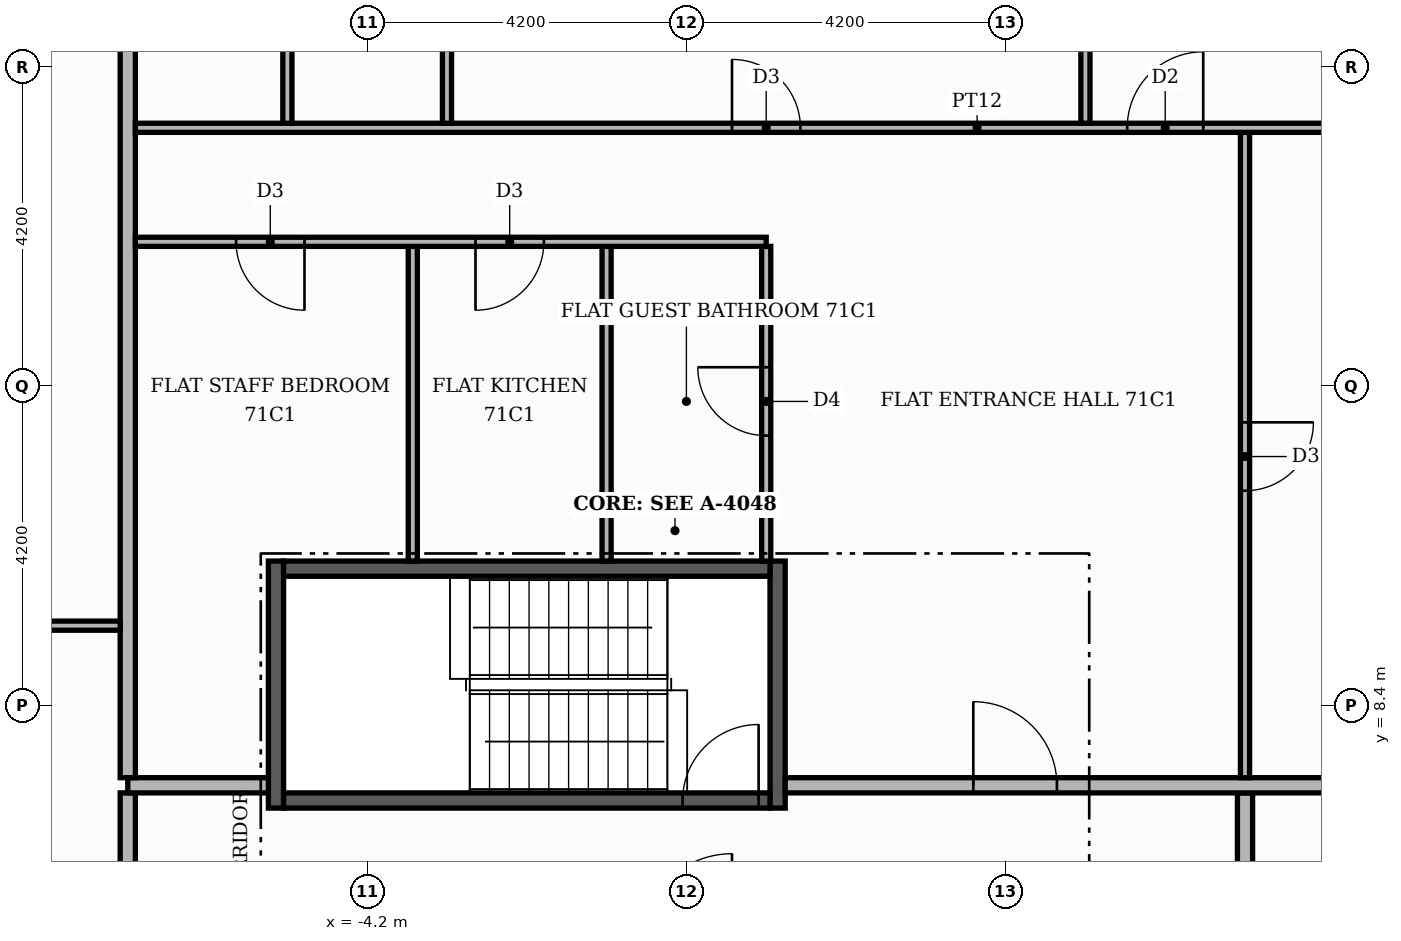
"""IFC4 building model, lengths in metres.
Left out: names, types, materials, properties, quantities, classifications, styles, units other than length and angle.
Written with IfcOpenShell. Run it as: python <this file> out.ifc"""

import sys

from ifc_helpers import new_model, si_unit, direction, frame, frame_2d, origin, place, context, subcontext, project, spatial, rectangle, extrude, element, fill, save


model = new_model("IFC4")
c1 = context("Model", 3, precision=1e-05, world=origin(), true_north=direction((0.0, 1.0)))
c2 = subcontext(c1, "Body", "Model", "MODEL_VIEW")
j1 = project(units=[si_unit("LENGTHUNIT", "METRE"), si_unit("PLANEANGLEUNIT", "RADIAN")], contexts=[c1])
p1 = place(None, origin())
s1 = spatial("IfcSite", under=j1, at=p1, CompositionType="ELEMENT")
p2 = place(p1, origin())
s2 = spatial("IfcBuilding", under=s1, at=p2, CompositionType="ELEMENT")
p3 = place(p2, frame((0.0, 0.0, 296.7)))
s3 = spatial("IfcBuildingStorey", under=s2, at=p3, CompositionType="ELEMENT", Elevation=296.7)
for number, where, z_axis, x_axis in (
    (1, (-5.4, 7.05, 0.0), (0.0, 0.0, 1.0), (0.0, 1.0, 0.0)),
    (2, (1.2, 7.05, 0.0), (0.0, 0.0, 1.0), (0.0, 1.0, 0.0)),
):
    element("IfcWall", number, at=place(p3, frame(where, z_axis=z_axis, x_axis=x_axis)), inside=s3, PredefinedType="SHEAR", context=c2, shape_type="SweptSolid", body=[
        extrude(rectangle(XDim=3.25, YDim=0.2, at=frame_2d((1.625, 0.0))), origin(), (0.0, 0.0, 1.0), 3.55),
    ])
p4 = place(p3, frame((-5.3, 7.15, 0.0), z_axis=(0.0, 0.0, 1.0), x_axis=(1.0, 0.0, 0.0)))
e3 = element("IfcWall", 3, at=p4, inside=s3, PredefinedType="SHEAR", context=c2, shape_type="SweptSolid", body=[
    extrude(rectangle(XDim=6.4, YDim=0.2, at=frame_2d((3.2, 0.0))), origin(), (0.0, 0.0, 1.0), 3.55),
])
p5 = place(p4, frame((5.25, 0.0, 0.0)))
e4 = element("IfcOpeningElement", 4, at=p5, cuts=e3, PredefinedType="OPENING", context=c2, shape_type="SweptSolid", body=[
    extrude(rectangle(XDim=1.0, YDim=2.1, at=frame_2d((0.5, 1.05))), frame((0.0, 0.11, 0.0), z_axis=(0.0, -1.0, 0.0), x_axis=(1.0, 0.0, 0.0)), (0.0, 0.0, 1.0), 0.22),
])
p6 = place(p3, frame((-5.3, 10.2, 0.0), z_axis=(0.0, 0.0, 1.0), x_axis=(1.0, 0.0, 0.0)))
e5 = element("IfcWall", 5, at=p6, inside=s3, PredefinedType="SHEAR", context=c2, shape_type="SweptSolid", body=[
    extrude(rectangle(XDim=6.4, YDim=0.2, at=frame_2d((3.2, 0.0))), origin(), (0.0, 0.0, 1.0), 3.55),
])
p7 = place(p3, frame((-7.35, -7.25, 0.0), z_axis=(0.0, 0.0, 1.0), x_axis=(0.0, 1.0, 0.0)))
e6 = element("IfcWall", 6, at=p7, inside=s3, PredefinedType="PARTITIONING", context=c2, shape_type="SweptSolid", body=[
    extrude(rectangle(XDim=14.5, YDim=0.2, at=frame_2d((7.25, 0.0))), origin(), (0.0, 0.0, 1.0), 3.55),
])
p8 = place(p7, frame((11.95, 0.0, 0.0)))
e7 = element("IfcOpeningElement", 7, at=p8, cuts=e6, PredefinedType="OPENING", context=c2, shape_type="SweptSolid", body=[
    extrude(rectangle(XDim=1.1, YDim=2.4, at=frame_2d((0.55, 1.2))), frame((0.0, 0.11, 0.0), z_axis=(0.0, -1.0, 0.0), x_axis=(1.0, 0.0, 0.0)), (0.0, 0.0, 1.0), 0.22),
])
p9 = place(p3, frame((7.35, -7.25, 0.0), z_axis=(0.0, 0.0, 1.0), x_axis=(0.0, 1.0, 0.0)))
e8 = element("IfcWall", 8, at=p9, inside=s3, PredefinedType="PARTITIONING", context=c2, shape_type="SweptSolid", body=[
    extrude(rectangle(XDim=14.5, YDim=0.2, at=frame_2d((7.25, 0.0))), origin(), (0.0, 0.0, 1.0), 3.55),
])
p10 = place(p9, frame((2.5, 0.0, 0.0)))
e9 = element("IfcOpeningElement", 9, at=p10, cuts=e8, PredefinedType="OPENING", context=c2, shape_type="SweptSolid", body=[
    extrude(rectangle(XDim=1.1, YDim=2.4, at=frame_2d((0.55, 1.2))), frame((0.0, 0.11, 0.0), z_axis=(0.0, -1.0, 0.0), x_axis=(1.0, 0.0, 0.0)), (0.0, 0.0, 1.0), 0.22),
])
p11 = place(p3, frame((-7.35, 7.35, 0.0), z_axis=(0.0, 0.0, 1.0), x_axis=(1.0, 0.0, 0.0)))
e10 = element("IfcWall", 10, at=p11, inside=s3, PredefinedType="PARTITIONING", context=c2, shape_type="SweptSolid", body=[
    extrude(rectangle(XDim=1.85, YDim=0.2, at=frame_2d((0.925, 0.0))), origin(), (0.0, 0.0, 1.0), 3.55),
])
p12 = place(p3, frame((1.3, 7.35, 0.0), z_axis=(0.0, 0.0, 1.0), x_axis=(1.0, 0.0, 0.0)))
e11 = element("IfcWall", 11, at=p12, inside=s3, PredefinedType="PARTITIONING", context=c2, shape_type="SweptSolid", body=[
    extrude(rectangle(XDim=20.0, YDim=0.2, at=frame_2d((10.0, 0.0))), origin(), (0.0, 0.0, 1.0), 3.55),
])
p13 = place(p12, frame((2.475, 0.0, 0.0)))
e12 = element("IfcOpeningElement", 12, at=p13, cuts=e11, PredefinedType="OPENING", context=c2, shape_type="SweptSolid", body=[
    extrude(rectangle(XDim=1.1, YDim=2.4, at=frame_2d((0.55, 1.2))), frame((0.0, 0.11, 0.0), z_axis=(0.0, -1.0, 0.0), x_axis=(1.0, 0.0, 0.0)), (0.0, 0.0, 1.0), 0.22),
])
p14 = place(p3, frame((-7.35, 7.45, 0.0), z_axis=(0.0, 0.0, 1.0), x_axis=(0.0, 1.0, 0.0)))
e13 = element("IfcWall", 13, at=p14, inside=s3, PredefinedType="PARTITIONING", context=c2, shape_type="SweptSolid", body=[
    extrude(rectangle(XDim=13.85, YDim=0.2, at=frame_2d((6.925, 0.0))), origin(), (0.0, 0.0, 1.0), 3.55),
])
p15 = place(p3, frame((7.35, 7.45, 0.0), z_axis=(0.0, 0.0, 1.0), x_axis=(0.0, 1.0, 0.0)))
e14 = element("IfcWall", 14, at=p15, inside=s3, PredefinedType="PARTITIONING", context=c2, shape_type="SweptSolid", body=[
    extrude(rectangle(XDim=8.49, YDim=0.12, at=frame_2d((4.245, 0.0))), origin(), (0.0, 0.0, 1.0), 3.55),
])
p16 = place(p15, frame((3.775, 0.0, 0.0)))
e15 = element("IfcOpeningElement", 15, at=p16, cuts=e14, PredefinedType="OPENING", context=c2, shape_type="SweptSolid", body=[
    extrude(rectangle(XDim=0.9, YDim=2.1, at=frame_2d((0.45, 1.05))), frame((0.0, 0.07, 0.0), z_axis=(0.0, -1.0, 0.0), x_axis=(1.0, 0.0, 0.0)), (0.0, 0.0, 1.0), 0.14),
])
p17 = place(p3, frame((-16.0, 9.45, 0.0), z_axis=(0.0, 0.0, 1.0), x_axis=(1.0, 0.0, 0.0)))
e16 = element("IfcWall", 16, at=p17, inside=s3, PredefinedType="PARTITIONING", context=c2, shape_type="SweptSolid", body=[
    extrude(rectangle(XDim=8.55, YDim=0.12, at=frame_2d((4.275, 0.0))), origin(), (0.0, 0.0, 1.0), 3.55),
])
p18 = place(p17, frame((3.875, 0.0, 0.0)))
e17 = element("IfcOpeningElement", 17, at=p18, cuts=e16, PredefinedType="OPENING", context=c2, shape_type="SweptSolid", body=[
    extrude(rectangle(XDim=0.9, YDim=2.1, at=frame_2d((0.45, 1.05))), frame((0.0, 0.07, 0.0), z_axis=(0.0, -1.0, 0.0), x_axis=(1.0, 0.0, 0.0)), (0.0, 0.0, 1.0), 0.14),
])
for number, where, z_axis, x_axis in (
    (18, (-3.6, 10.3, 0.0), (0.0, 0.0, 1.0), (0.0, 1.0, 0.0)),
    (19, (-1.05, 10.3, 0.0), (0.0, 0.0, 1.0), (0.0, 1.0, 0.0)),
):
    element("IfcWall", number, at=place(p3, frame(where, z_axis=z_axis, x_axis=x_axis)), inside=s3, PredefinedType="PARTITIONING", context=c2, shape_type="SweptSolid", body=[
        extrude(rectangle(XDim=4.14, YDim=0.12, at=frame_2d((2.07, 0.0))), origin(), (0.0, 0.0, 1.0), 3.55),
    ])
p19 = place(p3, frame((1.05, 10.3, 0.0), z_axis=(0.0, 0.0, 1.0), x_axis=(0.0, 1.0, 0.0)))
e20 = element("IfcWall", 20, at=p19, inside=s3, PredefinedType="PARTITIONING", context=c2, shape_type="SweptSolid", body=[
    extrude(rectangle(XDim=4.14, YDim=0.12, at=frame_2d((2.07, 0.0))), origin(), (0.0, 0.0, 1.0), 3.55),
])
p20 = place(p19, frame((1.65, 0.0, 0.0)))
e21 = element("IfcOpeningElement", 21, at=p20, cuts=e20, PredefinedType="OPENING", context=c2, shape_type="SweptSolid", body=[
    extrude(rectangle(XDim=0.9, YDim=2.1, at=frame_2d((0.45, 1.05))), frame((0.0, 0.07, 0.0), z_axis=(0.0, -1.0, 0.0), x_axis=(1.0, 0.0, 0.0)), (0.0, 0.0, 1.0), 0.14),
])
p21 = place(p3, frame((-7.25, 14.5, 0.0), z_axis=(0.0, 0.0, 1.0), x_axis=(1.0, 0.0, 0.0)))
e22 = element("IfcWall", 22, at=p21, inside=s3, PredefinedType="PARTITIONING", context=c2, shape_type="SweptSolid", body=[
    extrude(rectangle(XDim=8.3, YDim=0.12, at=frame_2d((4.15, 0.0))), origin(), (0.0, 0.0, 1.0), 3.55),
])
p22 = place(p21, frame((4.475, 0.0, 0.0)))
e23 = element("IfcOpeningElement", 23, at=p22, cuts=e22, PredefinedType="OPENING", context=c2, shape_type="SweptSolid", body=[
    extrude(rectangle(XDim=0.9, YDim=2.1, at=frame_2d((0.45, 1.05))), frame((0.0, 0.07, 0.0), z_axis=(0.0, -1.0, 0.0), x_axis=(1.0, 0.0, 0.0)), (0.0, 0.0, 1.0), 0.14),
])
p23 = place(p21, frame((1.325, 0.0, 0.0)))
e24 = element("IfcOpeningElement", 24, at=p23, cuts=e22, PredefinedType="OPENING", context=c2, shape_type="SweptSolid", body=[
    extrude(rectangle(XDim=0.9, YDim=2.1, at=frame_2d((0.45, 1.05))), frame((0.0, 0.07, 0.0), z_axis=(0.0, -1.0, 0.0), x_axis=(1.0, 0.0, 0.0)), (0.0, 0.0, 1.0), 0.14),
])
p24 = place(p3, frame((-7.25, 16.0, 0.0), z_axis=(0.0, 0.0, 1.0), x_axis=(1.0, 0.0, 0.0)))
e25 = element("IfcWall", 25, at=p24, inside=s3, PredefinedType="PARTITIONING", context=c2, shape_type="SweptSolid", body=[
    extrude(rectangle(XDim=22.15, YDim=0.12, at=frame_2d((11.075, 0.0))), origin(), (0.0, 0.0, 1.0), 3.55),
])
p25 = place(p24, frame((13.05, 0.0, 0.0)))
e26 = element("IfcOpeningElement", 26, at=p25, cuts=e25, PredefinedType="OPENING", context=c2, shape_type="SweptSolid", body=[
    extrude(rectangle(XDim=1.0, YDim=2.1, at=frame_2d((0.5, 1.05))), frame((0.0, 0.07, 0.0), z_axis=(0.0, -1.0, 0.0), x_axis=(1.0, 0.0, 0.0)), (0.0, 0.0, 1.0), 0.14),
])
p26 = place(p24, frame((7.85, 0.0, 0.0)))
e27 = element("IfcOpeningElement", 27, at=p26, cuts=e25, PredefinedType="OPENING", context=c2, shape_type="SweptSolid", body=[
    extrude(rectangle(XDim=0.9, YDim=2.1, at=frame_2d((0.45, 1.05))), frame((0.0, 0.07, 0.0), z_axis=(0.0, -1.0, 0.0), x_axis=(1.0, 0.0, 0.0)), (0.0, 0.0, 1.0), 0.14),
])
p27 = place(p3, frame((-5.25, 16.06, 0.0), z_axis=(0.0, 0.0, 1.0), x_axis=(0.0, 1.0, 0.0)))
e28 = element("IfcWall", 28, at=p27, inside=s3, PredefinedType="PARTITIONING", context=c2, shape_type="SweptSolid", body=[
    extrude(rectangle(XDim=5.24, YDim=0.12, at=frame_2d((2.62, 0.0))), origin(), (0.0, 0.0, 1.0), 3.55),
])
p28 = place(p27, frame((2.29, 0.0, 0.0)))
e29 = element("IfcOpeningElement", 29, at=p28, cuts=e28, PredefinedType="OPENING", context=c2, shape_type="SweptSolid", body=[
    extrude(rectangle(XDim=0.9, YDim=2.1, at=frame_2d((0.45, 1.05))), frame((0.0, 0.07, 0.0), z_axis=(0.0, -1.0, 0.0), x_axis=(1.0, 0.0, 0.0)), (0.0, 0.0, 1.0), 0.14),
])
p29 = place(p3, frame((-3.15, 16.06, 0.0), z_axis=(0.0, 0.0, 1.0), x_axis=(0.0, 1.0, 0.0)))
e30 = element("IfcWall", 30, at=p29, inside=s3, PredefinedType="PARTITIONING", context=c2, shape_type="SweptSolid", body=[
    extrude(rectangle(XDim=5.24, YDim=0.12, at=frame_2d((2.62, 0.0))), origin(), (0.0, 0.0, 1.0), 3.55),
])
p30 = place(p29, frame((2.29, 0.0, 0.0)))
e31 = element("IfcOpeningElement", 31, at=p30, cuts=e30, PredefinedType="OPENING", context=c2, shape_type="SweptSolid", body=[
    extrude(rectangle(XDim=0.9, YDim=2.1, at=frame_2d((0.45, 1.05))), frame((0.0, 0.07, 0.0), z_axis=(0.0, -1.0, 0.0), x_axis=(1.0, 0.0, 0.0)), (0.0, 0.0, 1.0), 0.14),
])
p31 = place(p3, frame((5.25, 16.06, 0.0), z_axis=(0.0, 0.0, 1.0), x_axis=(0.0, 1.0, 0.0)))
e32 = element("IfcWall", 32, at=p31, inside=s3, PredefinedType="PARTITIONING", context=c2, shape_type="SweptSolid", body=[
    extrude(rectangle(XDim=5.24, YDim=0.12, at=frame_2d((2.62, 0.0))), origin(), (0.0, 0.0, 1.0), 3.55),
])
p32 = place(p5, origin())
e33 = element("IfcDoor", 33, at=p32, inside=s3, OperationType="SINGLE_SWING_RIGHT", PredefinedType="DOOR", context=c2, shape_type="SweptSolid", body=[
    extrude(rectangle(XDim=1.0, YDim=2.1, at=frame_2d((0.5, 1.05))), frame((0.0, 0.025, 0.0), z_axis=(0.0, -1.0, 0.0), x_axis=(1.0, 0.0, 0.0)), (0.0, 0.0, 1.0), 0.05),
])
fill(e4, e33)
p33 = place(p13, origin())
e34 = element("IfcDoor", 34, at=p33, inside=s3, OperationType="SINGLE_SWING_LEFT", PredefinedType="DOOR", context=c2, shape_type="SweptSolid", body=[
    extrude(rectangle(XDim=1.1, YDim=2.4, at=frame_2d((0.55, 1.2))), frame((0.0, 0.025, 0.0), z_axis=(0.0, -1.0, 0.0), x_axis=(1.0, 0.0, 0.0)), (0.0, 0.0, 1.0), 0.05),
])
fill(e12, e34)
p34 = place(p16, frame((0.9, 0.0, 0.0), z_axis=(0.0, 0.0, 1.0), x_axis=(-1.0, 0.0, 0.0)))
e35 = element("IfcDoor", 35, at=p34, inside=s3, OperationType="SINGLE_SWING_RIGHT", PredefinedType="DOOR", context=c2, shape_type="SweptSolid", body=[
    extrude(rectangle(XDim=0.9, YDim=2.1, at=frame_2d((0.45, 1.05))), frame((0.0, 0.025, 0.0), z_axis=(0.0, -1.0, 0.0), x_axis=(1.0, 0.0, 0.0)), (0.0, 0.0, 1.0), 0.05),
])
fill(e15, e35)
p35 = place(p20, origin())
e36 = element("IfcDoor", 36, at=p35, inside=s3, OperationType="SINGLE_SWING_RIGHT", PredefinedType="DOOR", context=c2, shape_type="SweptSolid", body=[
    extrude(rectangle(XDim=0.9, YDim=2.1, at=frame_2d((0.45, 1.05))), frame((0.0, 0.025, 0.0), z_axis=(0.0, -1.0, 0.0), x_axis=(1.0, 0.0, 0.0)), (0.0, 0.0, 1.0), 0.05),
])
fill(e21, e36)
p36 = place(p22, frame((0.9, 0.0, 0.0), z_axis=(0.0, 0.0, 1.0), x_axis=(-1.0, 0.0, 0.0)))
e37 = element("IfcDoor", 37, at=p36, inside=s3, OperationType="SINGLE_SWING_LEFT", PredefinedType="DOOR", context=c2, shape_type="SweptSolid", body=[
    extrude(rectangle(XDim=0.9, YDim=2.1, at=frame_2d((0.45, 1.05))), frame((0.0, 0.025, 0.0), z_axis=(0.0, -1.0, 0.0), x_axis=(1.0, 0.0, 0.0)), (0.0, 0.0, 1.0), 0.05),
])
fill(e23, e37)
p37 = place(p23, frame((0.9, 0.0, 0.0), z_axis=(0.0, 0.0, 1.0), x_axis=(-1.0, 0.0, 0.0)))
e38 = element("IfcDoor", 38, at=p37, inside=s3, OperationType="SINGLE_SWING_RIGHT", PredefinedType="DOOR", context=c2, shape_type="SweptSolid", body=[
    extrude(rectangle(XDim=0.9, YDim=2.1, at=frame_2d((0.45, 1.05))), frame((0.0, 0.025, 0.0), z_axis=(0.0, -1.0, 0.0), x_axis=(1.0, 0.0, 0.0)), (0.0, 0.0, 1.0), 0.05),
])
fill(e24, e38)
p38 = place(p25, origin())
e39 = element("IfcDoor", 39, at=p38, inside=s3, OperationType="SINGLE_SWING_RIGHT", PredefinedType="DOOR", context=c2, shape_type="SweptSolid", body=[
    extrude(rectangle(XDim=1.0, YDim=2.1, at=frame_2d((0.5, 1.05))), frame((0.0, 0.025, 0.0), z_axis=(0.0, -1.0, 0.0), x_axis=(1.0, 0.0, 0.0)), (0.0, 0.0, 1.0), 0.05),
])
fill(e26, e39)
p39 = place(p26, origin())
e40 = element("IfcDoor", 40, at=p39, inside=s3, OperationType="SINGLE_SWING_LEFT", PredefinedType="DOOR", context=c2, shape_type="SweptSolid", body=[
    extrude(rectangle(XDim=0.9, YDim=2.1, at=frame_2d((0.45, 1.05))), frame((0.0, 0.025, 0.0), z_axis=(0.0, -1.0, 0.0), x_axis=(1.0, 0.0, 0.0)), (0.0, 0.0, 1.0), 0.05),
])
fill(e27, e40)
save(model, sys.argv[1])
